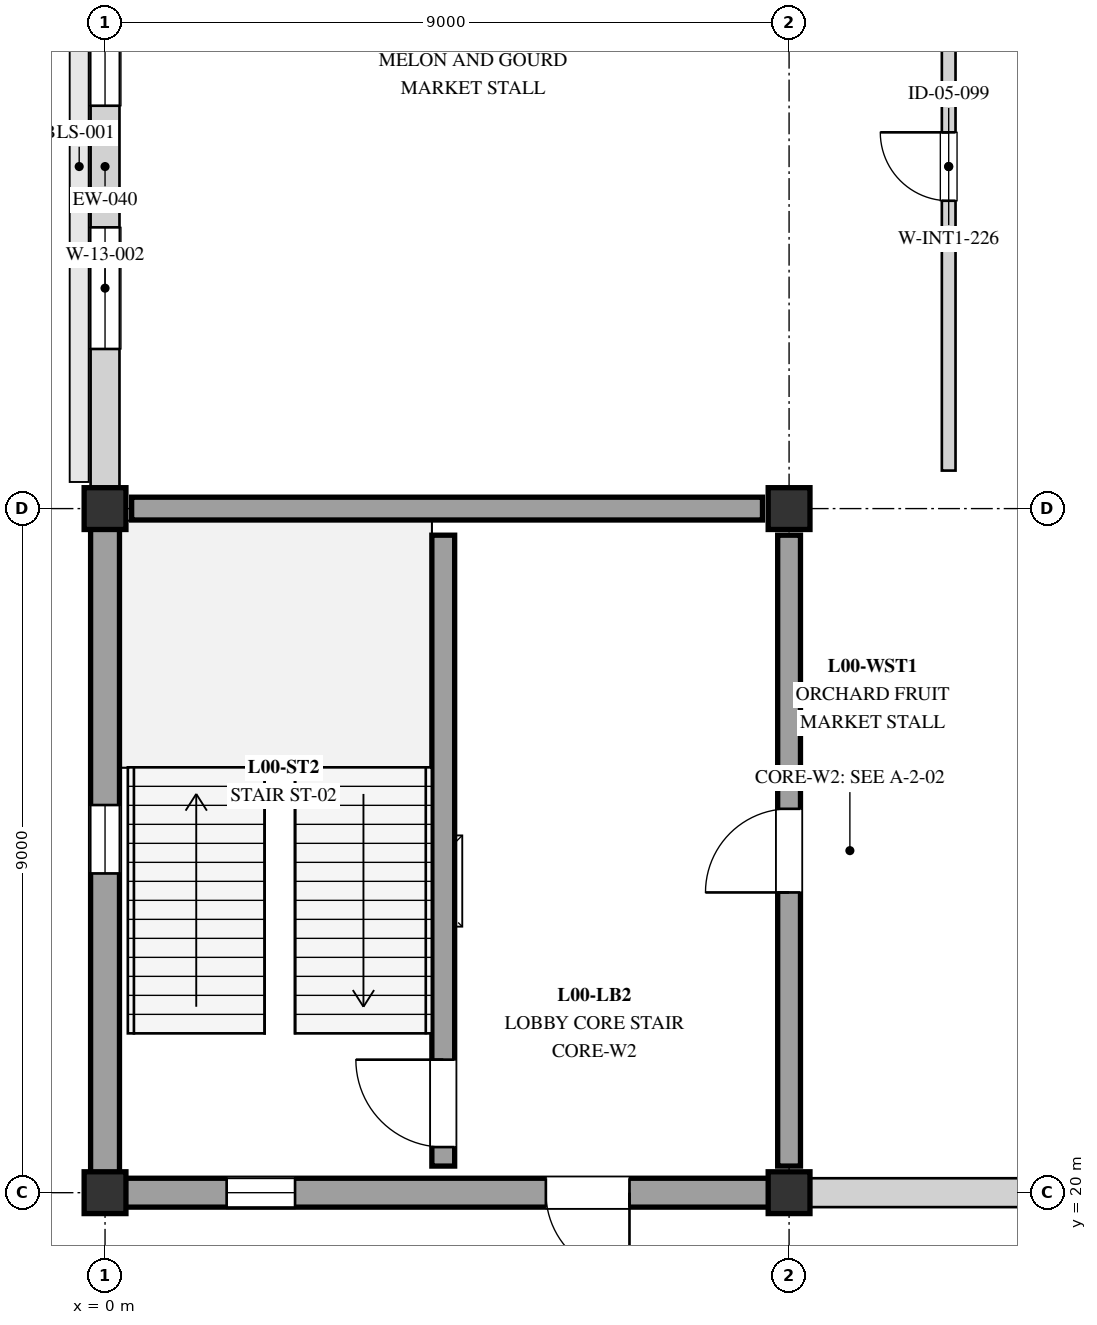
"""IFC4 building model, lengths in metres.
Left out: names, types, materials, properties, quantities, classifications, styles, units other than length and angle.
Written with IfcOpenShell. Run it as: python <this file> out.ifc"""

import sys

from ifc_helpers import new_model, si_unit, direction, frame, frame_2d, origin, origin_2d, place, context, subcontext, project, spatial, rectangle, extrude, element, fill, save


model = new_model("IFC4")
c1 = context("Model", 3, precision=1e-05, world=origin(), true_north=direction((0.0, 1.0)))
c2 = subcontext(c1, "Body", "Model", "MODEL_VIEW")
j1 = project(units=[si_unit("LENGTHUNIT", "METRE"), si_unit("PLANEANGLEUNIT", "RADIAN")], contexts=[c1])
p1 = place(None, origin())
s1 = spatial("IfcSite", under=j1, at=p1, CompositionType="ELEMENT")
p2 = place(p1, origin())
s2 = spatial("IfcBuilding", under=s1, at=p2, CompositionType="ELEMENT")
p3 = place(p2, origin())
s3 = spatial("IfcBuildingStorey", under=s2, at=p3, CompositionType="ELEMENT", Elevation=0.0)
for number, where, z_axis, x_axis in (
    (1, (0.0, 20.0, 0.0), (0.0, 0.0, 1.0), (1.0, 0.0, 0.0)),
    (2, (0.0, 29.0, 0.0), (0.0, 0.0, 1.0), (1.0, 0.0, 0.0)),
    (3, (9.0, 20.0, 0.0), (0.0, 0.0, 1.0), (1.0, 0.0, 0.0)),
    (4, (9.0, 29.0, 0.0), (0.0, 0.0, 1.0), (1.0, 0.0, 0.0)),
):
    element("IfcColumn", number, at=place(p3, frame(where, z_axis=z_axis, x_axis=x_axis)), inside=s3, PredefinedType="COLUMN", context=c2, shape_type="SweptSolid", body=[
        extrude(rectangle(XDim=0.55, YDim=0.55, at=origin_2d()), origin(), (0.0, 0.0, 1.0), 4.5),
    ])
p4 = place(p3, frame((0.0, 20.0, 0.0), z_axis=(0.0, 0.0, 1.0), x_axis=(0.0, 1.0, 0.0)))
e5 = element("IfcWall", 5, at=p4, inside=s3, PredefinedType="STANDARD", context=c2, shape_type="SweptSolid", body=[
    extrude(rectangle(XDim=9.0, YDim=0.38, at=frame_2d((4.5, 0.0))), origin(), (0.0, 0.0, 1.0), 4.22),
])
p5 = place(p4, frame((4.2, 0.0, 0.76)))
e6 = element("IfcOpeningElement", 6, at=p5, cuts=e5, PredefinedType="OPENING", context=c2, shape_type="SweptSolid", body=[
    extrude(rectangle(XDim=0.9, YDim=2.4, at=frame_2d((0.45, 1.2))), frame((0.0, 0.2, 0.0), z_axis=(0.0, -1.0, 0.0), x_axis=(1.0, 0.0, 0.0)), (0.0, 0.0, 1.0), 0.4),
])
p6 = place(p3, frame((0.0, 29.0, 0.0), z_axis=(0.0, 0.0, 1.0), x_axis=(0.0, 1.0, 0.0)))
e7 = element("IfcWall", 7, at=p6, inside=s3, PredefinedType="STANDARD", context=c2, shape_type="SweptSolid", body=[
    extrude(rectangle(XDim=9.0, YDim=0.38, at=frame_2d((4.5, 0.0))), origin(), (0.0, 0.0, 1.0), 3.35),
])
p7 = place(p6, frame((2.1, 0.0, 0.95)))
e8 = element("IfcOpeningElement", 8, at=p7, cuts=e7, PredefinedType="OPENING", context=c2, shape_type="SweptSolid", body=[
    extrude(rectangle(XDim=1.6, YDim=2.1, at=frame_2d((0.8, 1.05))), frame((0.0, 0.2, 0.0), z_axis=(0.0, -1.0, 0.0), x_axis=(1.0, 0.0, 0.0)), (0.0, 0.0, 1.0), 0.4),
])
p8 = place(p6, frame((5.3, 0.0, 0.95)))
e9 = element("IfcOpeningElement", 9, at=p8, cuts=e7, PredefinedType="OPENING", context=c2, shape_type="SweptSolid", body=[
    extrude(rectangle(XDim=1.6, YDim=2.1, at=frame_2d((0.8, 1.05))), frame((0.0, 0.2, 0.0), z_axis=(0.0, -1.0, 0.0), x_axis=(1.0, 0.0, 0.0)), (0.0, 0.0, 1.0), 0.4),
])
p9 = place(p3, frame((9.0, 20.0, 0.0), z_axis=(0.0, 0.0, 1.0), x_axis=(-1.0, 0.0, 0.0)))
e10 = element("IfcWall", 10, at=p9, inside=s3, PredefinedType="STANDARD", context=c2, shape_type="SweptSolid", body=[
    extrude(rectangle(XDim=9.0, YDim=0.38, at=frame_2d((4.5, 0.0))), origin(), (0.0, 0.0, 1.0), 4.22),
])
p10 = place(p9, frame((6.5, 0.0, 0.76)))
e11 = element("IfcOpeningElement", 11, at=p10, cuts=e10, PredefinedType="OPENING", context=c2, shape_type="SweptSolid", body=[
    extrude(rectangle(XDim=0.9, YDim=2.4, at=frame_2d((0.45, 1.2))), frame((0.0, 0.2, 0.0), z_axis=(0.0, -1.0, 0.0), x_axis=(1.0, 0.0, 0.0)), (0.0, 0.0, 1.0), 0.4),
])
p11 = place(p9, frame((2.1, 0.0, 0.0)))
e12 = element("IfcOpeningElement", 12, at=p11, cuts=e10, PredefinedType="OPENING", context=c2, shape_type="SweptSolid", body=[
    extrude(rectangle(XDim=1.1, YDim=2.2, at=frame_2d((0.55, 1.1))), frame((0.0, 0.2, 0.0), z_axis=(0.0, -1.0, 0.0), x_axis=(1.0, 0.0, 0.0)), (0.0, 0.0, 1.0), 0.4),
])
p12 = place(p3, frame((9.0, 20.0, 0.0), z_axis=(0.0, 0.0, 1.0), x_axis=(1.0, 0.0, 0.0)))
e13 = element("IfcWall", 13, at=p12, inside=s3, PredefinedType="STANDARD", context=c2, shape_type="SweptSolid", body=[
    extrude(rectangle(XDim=9.0, YDim=0.38, at=frame_2d((4.5, 0.0))), origin(), (0.0, 0.0, 1.0), 3.35),
])
p13 = place(p12, frame((3.45, 0.0, 0.0)))
e14 = element("IfcOpeningElement", 14, at=p13, cuts=e13, PredefinedType="OPENING", context=c2, shape_type="SweptSolid", body=[
    extrude(rectangle(XDim=2.1, YDim=2.5, at=frame_2d((1.05, 1.25))), frame((0.0, 0.2, 0.0), z_axis=(0.0, -1.0, 0.0), x_axis=(1.0, 0.0, 0.0)), (0.0, 0.0, 1.0), 0.4),
])
p14 = place(p3, frame((4.45, 20.35, 0.0), z_axis=(0.0, 0.0, 1.0), x_axis=(0.0, 1.0, 0.0)))
e15 = element("IfcWall", 15, at=p14, inside=s3, PredefinedType="SHEAR", context=c2, shape_type="SweptSolid", body=[
    extrude(rectangle(XDim=8.3, YDim=0.3, at=frame_2d((4.15, 0.0))), origin(), (0.0, 0.0, 1.0), 4.22),
])
p15 = place(p14, frame((0.25, 0.0, 0.0)))
e16 = element("IfcOpeningElement", 16, at=p15, cuts=e15, PredefinedType="OPENING", context=c2, shape_type="SweptSolid", body=[
    extrude(rectangle(XDim=1.15, YDim=2.15, at=frame_2d((0.575, 1.075))), frame((0.0, 0.16, 0.0), z_axis=(0.0, -1.0, 0.0), x_axis=(1.0, 0.0, 0.0)), (0.0, 0.0, 1.0), 0.32),
])
p16 = place(p3, frame((9.0, 20.35, 0.0), z_axis=(0.0, 0.0, 1.0), x_axis=(0.0, 1.0, 0.0)))
e17 = element("IfcWall", 17, at=p16, inside=s3, PredefinedType="SHEAR", context=c2, shape_type="SweptSolid", body=[
    extrude(rectangle(XDim=8.3, YDim=0.3, at=frame_2d((4.15, 0.0))), origin(), (0.0, 0.0, 1.0), 4.22),
])
p17 = place(p16, frame((3.6, 0.0, 0.0)))
e18 = element("IfcOpeningElement", 18, at=p17, cuts=e17, PredefinedType="OPENING", context=c2, shape_type="SweptSolid", body=[
    extrude(rectangle(XDim=1.1, YDim=2.1, at=frame_2d((0.55, 1.05))), frame((0.0, 0.16, 0.0), z_axis=(0.0, -1.0, 0.0), x_axis=(1.0, 0.0, 0.0)), (0.0, 0.0, 1.0), 0.32),
])
p18 = place(p3, frame((0.35, 29.0, 0.0), z_axis=(0.0, 0.0, 1.0), x_axis=(1.0, 0.0, 0.0)))
e19 = element("IfcWall", 19, at=p18, inside=s3, PredefinedType="SHEAR", context=c2, shape_type="SweptSolid", body=[
    extrude(rectangle(XDim=8.3, YDim=0.3, at=frame_2d((4.15, 0.0))), origin(), (0.0, 0.0, 1.0), 4.22),
])
p19 = place(p3, frame((11.1, 29.5, 0.0), z_axis=(0.0, 0.0, 1.0), x_axis=(0.0, 1.0, 0.0)))
e20 = element("IfcWall", 20, at=p19, inside=s3, PredefinedType="STANDARD", context=c2, shape_type="SweptSolid", body=[
    extrude(rectangle(XDim=8.0, YDim=0.18, at=frame_2d((4.0, 0.0))), origin(), (0.0, 0.0, 1.0), 3.2),
])
p20 = place(p19, frame((3.55, 0.0, 0.0)))
e21 = element("IfcOpeningElement", 21, at=p20, cuts=e20, PredefinedType="OPENING", context=c2, shape_type="SweptSolid", body=[
    extrude(rectangle(XDim=0.9, YDim=2.05, at=frame_2d((0.45, 1.025))), frame((0.0, 0.1, 0.0), z_axis=(0.0, -1.0, 0.0), x_axis=(1.0, 0.0, 0.0)), (0.0, 0.0, 1.0), 0.2),
])
p21 = place(p5, origin())
e22 = element("IfcWindow", 22, at=p21, inside=s3, PartitioningType="SINGLE_PANEL", PredefinedType="WINDOW", context=c2, shape_type="SweptSolid", body=[
    extrude(rectangle(XDim=0.9, YDim=2.4, at=frame_2d((0.45, 1.2))), frame((0.0, 0.03, 0.0), z_axis=(0.0, -1.0, 0.0), x_axis=(1.0, 0.0, 0.0)), (0.0, 0.0, 1.0), 0.06),
])
fill(e6, e22)
p22 = place(p7, origin())
e23 = element("IfcWindow", 23, at=p22, inside=s3, PartitioningType="SINGLE_PANEL", PredefinedType="WINDOW", context=c2, shape_type="SweptSolid", body=[
    extrude(rectangle(XDim=1.6, YDim=2.1, at=frame_2d((0.8, 1.05))), frame((0.0, 0.03, 0.0), z_axis=(0.0, -1.0, 0.0), x_axis=(1.0, 0.0, 0.0)), (0.0, 0.0, 1.0), 0.06),
])
fill(e8, e23)
p23 = place(p8, origin())
e24 = element("IfcWindow", 24, at=p23, inside=s3, PartitioningType="SINGLE_PANEL", PredefinedType="WINDOW", context=c2, shape_type="SweptSolid", body=[
    extrude(rectangle(XDim=1.6, YDim=2.1, at=frame_2d((0.8, 1.05))), frame((0.0, 0.03, 0.0), z_axis=(0.0, -1.0, 0.0), x_axis=(1.0, 0.0, 0.0)), (0.0, 0.0, 1.0), 0.06),
])
fill(e9, e24)
p24 = place(p10, origin())
e25 = element("IfcWindow", 25, at=p24, inside=s3, PartitioningType="SINGLE_PANEL", PredefinedType="WINDOW", context=c2, shape_type="SweptSolid", body=[
    extrude(rectangle(XDim=0.9, YDim=2.4, at=frame_2d((0.45, 1.2))), frame((0.0, 0.03, 0.0), z_axis=(0.0, -1.0, 0.0), x_axis=(1.0, 0.0, 0.0)), (0.0, 0.0, 1.0), 0.06),
])
fill(e11, e25)
p25 = place(p11, origin())
e26 = element("IfcDoor", 26, at=p25, inside=s3, OperationType="SINGLE_SWING_LEFT", PredefinedType="DOOR", context=c2, shape_type="SweptSolid", body=[
    extrude(rectangle(XDim=1.1, YDim=2.2, at=frame_2d((0.55, 1.1))), frame((0.0, 0.025, 0.0), z_axis=(0.0, -1.0, 0.0), x_axis=(1.0, 0.0, 0.0)), (0.0, 0.0, 1.0), 0.05),
])
fill(e12, e26)
p26 = place(p15, origin())
e27 = element("IfcDoor", 27, at=p26, inside=s3, OperationType="SINGLE_SWING_RIGHT", PredefinedType="DOOR", context=c2, shape_type="SweptSolid", body=[
    extrude(rectangle(XDim=1.15, YDim=2.15, at=frame_2d((0.575, 1.075))), frame((0.0, 0.025, 0.0), z_axis=(0.0, -1.0, 0.0), x_axis=(1.0, 0.0, 0.0)), (0.0, 0.0, 1.0), 0.05),
])
fill(e16, e27)
p27 = place(p17, origin())
e28 = element("IfcDoor", 28, at=p27, inside=s3, OperationType="SINGLE_SWING_LEFT", PredefinedType="DOOR", context=c2, shape_type="SweptSolid", body=[
    extrude(rectangle(XDim=1.1, YDim=2.1, at=frame_2d((0.55, 1.05))), frame((0.0, 0.025, 0.0), z_axis=(0.0, -1.0, 0.0), x_axis=(1.0, 0.0, 0.0)), (0.0, 0.0, 1.0), 0.05),
])
fill(e18, e28)
p28 = place(p20, origin())
e29 = element("IfcDoor", 29, at=p28, inside=s3, OperationType="SINGLE_SWING_RIGHT", PredefinedType="DOOR", context=c2, shape_type="SweptSolid", body=[
    extrude(rectangle(XDim=0.9, YDim=2.05, at=frame_2d((0.45, 1.025))), frame((0.0, 0.025, 0.0), z_axis=(0.0, -1.0, 0.0), x_axis=(1.0, 0.0, 0.0)), (0.0, 0.0, 1.0), 0.05),
])
fill(e21, e29)
save(model, sys.argv[1])
